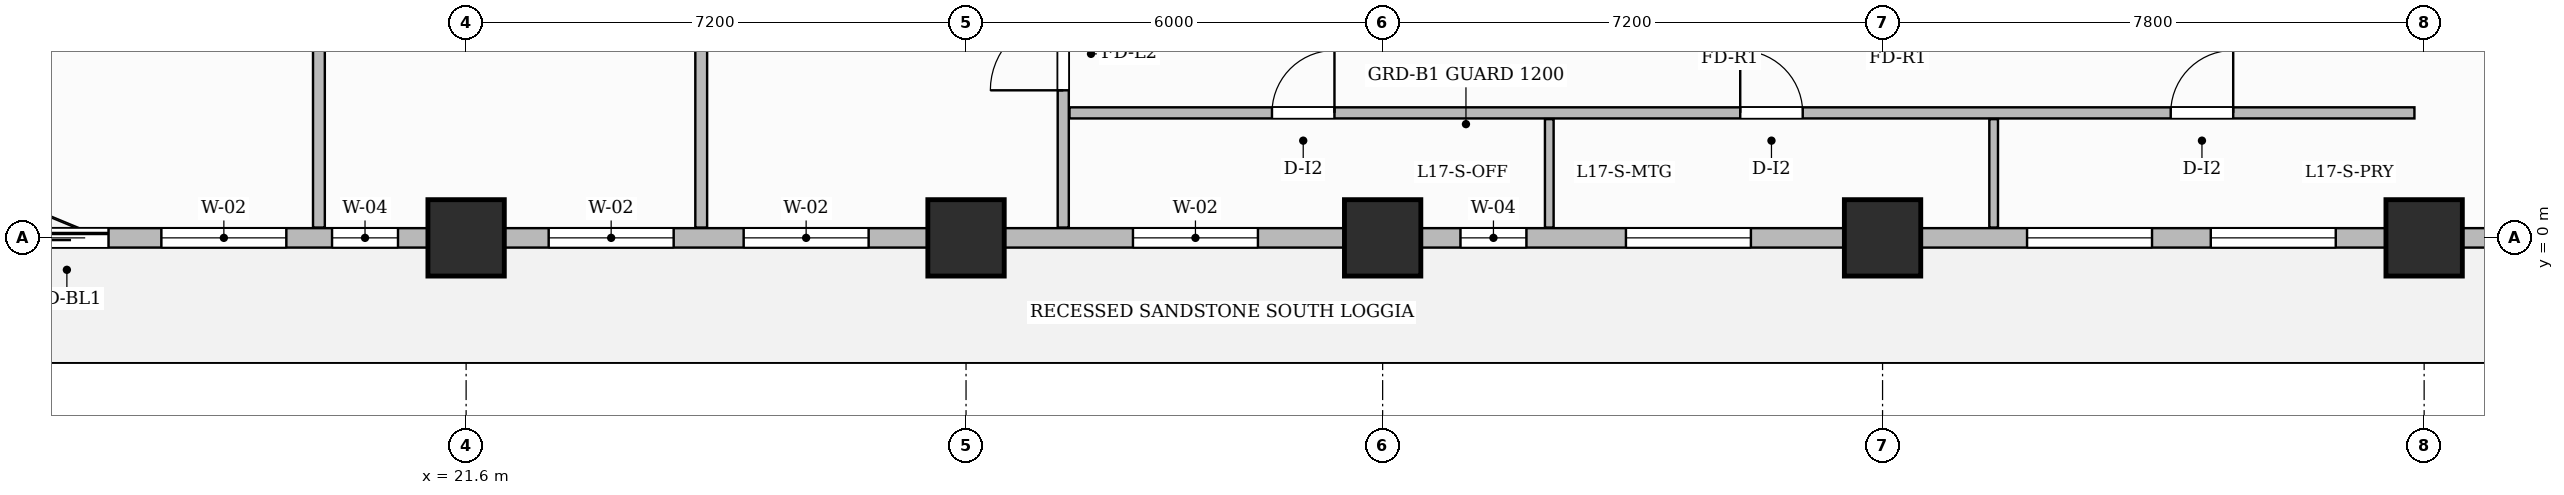
"""IFC4 building model, lengths in metres.
Left out: names, types, materials, properties, quantities, classifications, styles, units other than length and angle.
Written with IfcOpenShell. Run it as: python <this file> out.ifc"""

import sys

from ifc_helpers import new_model, si_unit, direction, frame, frame_2d, origin, origin_2d, place, context, subcontext, project, spatial, rectangle, extrude, source, transform, mapped, element, fill, save


model = new_model("IFC4")
c1 = context("Model", 3, precision=1e-05, world=origin(), true_north=direction((0.0, 1.0)))
c2 = subcontext(c1, "Body", "Model", "MODEL_VIEW")
j1 = project(units=[si_unit("LENGTHUNIT", "METRE"), si_unit("PLANEANGLEUNIT", "RADIAN")], contexts=[c1])
p1 = place(None, origin())
s1 = spatial("IfcSite", under=j1, at=p1, CompositionType="ELEMENT")
p2 = place(p1, origin())
s2 = spatial("IfcBuilding", under=s1, at=p2, CompositionType="ELEMENT")
p3 = place(p2, frame((0.0, 0.0, 73.1)))
s3 = spatial("IfcBuildingStorey", under=s2, at=p3, CompositionType="ELEMENT", Elevation=73.1)
m1 = source(origin(), c2, "Body", "SweptSolid", [
    extrude(rectangle(XDim=1.1, YDim=1.1, at=origin_2d()), origin(), (0.0, 0.0, 1.0), 3.7),
])
for number, where, z_axis, x_axis in (
    (1, (21.6, 0.0, 0.0), (0.0, 0.0, 1.0), (1.0, 0.0, 0.0)),
    (2, (28.8, 0.0, 0.0), (0.0, 0.0, 1.0), (1.0, 0.0, 0.0)),
    (3, (34.8, 0.0, 0.0), (0.0, 0.0, 1.0), (1.0, 0.0, 0.0)),
    (4, (42.0, 0.0, 0.0), (0.0, 0.0, 1.0), (1.0, 0.0, 0.0)),
    (5, (49.8, 0.0, 0.0), (0.0, 0.0, 1.0), (1.0, 0.0, 0.0)),
):
    element("IfcColumn", number, at=place(p3, frame(where, z_axis=z_axis, x_axis=x_axis)), inside=s3, PredefinedType="COLUMN", context=c2, shape_type="MappedRepresentation", body=[
        mapped(m1, transform((0.0, 0.0, 0.0), scale=1.0)),
    ])
p4 = place(p3, frame((30.2, 0.148, 0.0), z_axis=(0.0, 0.0, 1.0), x_axis=(0.0, 1.0, 0.0)))
e6 = element("IfcWall", 6, at=p4, inside=s3, PredefinedType="PARTITIONING", context=c2, shape_type="SweptSolid", body=[
    extrude(rectangle(XDim=9.112, YDim=0.16, at=frame_2d((4.556, 0.0))), origin(), (0.0, 0.0, 1.0), 3.45),
])
p5 = place(p4, frame((1.977, 0.0, 0.0)))
e7 = element("IfcOpeningElement", 7, at=p5, cuts=e6, PredefinedType="OPENING", context=c2, shape_type="SweptSolid", body=[
    extrude(rectangle(XDim=1.05, YDim=2.15, at=frame_2d((0.525, 1.075))), frame((0.0, 0.09, 0.0), z_axis=(0.0, -1.0, 0.0), x_axis=(1.0, 0.0, 0.0)), (0.0, 0.0, 1.0), 0.18),
])
p6 = place(p3, frame((30.29, 1.8, 0.0), z_axis=(0.0, 0.0, 1.0), x_axis=(1.0, 0.0, 0.0)))
e8 = element("IfcWall", 8, at=p6, inside=s3, PredefinedType="PARTITIONING", context=c2, shape_type="SweptSolid", body=[
    extrude(rectangle(XDim=19.37, YDim=0.16, at=frame_2d((9.685, 0.0))), origin(), (0.0, 0.0, 1.0), 3.45),
])
p7 = place(p6, frame((2.916, 0.0, 0.0)))
e9 = element("IfcOpeningElement", 9, at=p7, cuts=e8, PredefinedType="OPENING", context=c2, shape_type="SweptSolid", body=[
    extrude(rectangle(XDim=0.9, YDim=2.15, at=frame_2d((0.45, 1.075))), frame((0.0, 0.09, 0.0), z_axis=(0.0, -1.0, 0.0), x_axis=(1.0, 0.0, 0.0)), (0.0, 0.0, 1.0), 0.18),
])
p8 = place(p6, frame((9.66, 0.0, 0.0)))
e10 = element("IfcOpeningElement", 10, at=p8, cuts=e8, PredefinedType="OPENING", context=c2, shape_type="SweptSolid", body=[
    extrude(rectangle(XDim=0.9, YDim=2.15, at=frame_2d((0.45, 1.075))), frame((0.0, 0.09, 0.0), z_axis=(0.0, -1.0, 0.0), x_axis=(1.0, 0.0, 0.0)), (0.0, 0.0, 1.0), 0.18),
])
p9 = place(p6, frame((15.86, 0.0, 0.0)))
e11 = element("IfcOpeningElement", 11, at=p9, cuts=e8, PredefinedType="OPENING", context=c2, shape_type="SweptSolid", body=[
    extrude(rectangle(XDim=0.9, YDim=2.15, at=frame_2d((0.45, 1.075))), frame((0.0, 0.09, 0.0), z_axis=(0.0, -1.0, 0.0), x_axis=(1.0, 0.0, 0.0)), (0.0, 0.0, 1.0), 0.18),
])
for number, where, z_axis, x_axis in (
    (12, (37.2, 0.148, 0.0), (0.0, 0.0, 1.0), (0.0, 1.0, 0.0)),
    (13, (43.6, 0.148, 0.0), (0.0, 0.0, 1.0), (0.0, 1.0, 0.0)),
):
    element("IfcWall", number, at=place(p3, frame(where, z_axis=z_axis, x_axis=x_axis)), inside=s3, PredefinedType="PARTITIONING", context=c2, shape_type="SweptSolid", body=[
        extrude(rectangle(XDim=1.562, YDim=0.125, at=frame_2d((0.781, 0.0))), origin(), (0.0, 0.0, 1.0), 3.45),
    ])
p10 = place(p3, frame((19.48, 0.148, 0.0), z_axis=(0.0, 0.0, 1.0), x_axis=(0.0, 1.0, 0.0)))
e14 = element("IfcWall", 14, at=p10, inside=s3, PredefinedType="PARTITIONING", context=c2, shape_type="SweptSolid", body=[
    extrude(rectangle(XDim=9.112, YDim=0.17, at=frame_2d((4.556, 0.0))), origin(), (0.0, 0.0, 1.0), 3.45),
])
p11 = place(p3, frame((24.986, 0.148, 0.0), z_axis=(0.0, 0.0, 1.0), x_axis=(0.0, 1.0, 0.0)))
e15 = element("IfcWall", 15, at=p11, inside=s3, PredefinedType="PARTITIONING", context=c2, shape_type="SweptSolid", body=[
    extrude(rectangle(XDim=9.112, YDim=0.17, at=frame_2d((4.556, 0.0))), origin(), (0.0, 0.0, 1.0), 3.075),
])
p12 = place(p3, frame((14.4, 0.0, 0.0), z_axis=(0.0, 0.0, 1.0), x_axis=(1.0, 0.0, 0.0)))
e16 = element("IfcWall", 16, at=p12, inside=s3, PredefinedType="SOLIDWALL", context=c2, shape_type="SweptSolid", body=[
    extrude(rectangle(XDim=43.2, YDim=0.28, at=frame_2d((21.6, 0.0))), origin(), (0.0, 0.0, 1.0), 2.885),
])
p13 = place(p12, frame((0.85, 0.0, 0.0)))
e17 = element("IfcOpeningElement", 17, at=p13, cuts=e16, PredefinedType="OPENING", context=c2, shape_type="SweptSolid", body=[
    extrude(rectangle(XDim=1.2, YDim=2.2, at=frame_2d((0.6, 1.1))), frame((0.0, 0.15, 0.0), z_axis=(0.0, -1.0, 0.0), x_axis=(1.0, 0.0, 0.0)), (0.0, 0.0, 1.0), 0.3),
])
p14 = place(p12, frame((2.811, 0.0, 0.8)))
e18 = element("IfcOpeningElement", 18, at=p14, cuts=e16, PredefinedType="OPENING", context=c2, shape_type="SweptSolid", body=[
    extrude(rectangle(XDim=1.8, YDim=1.85, at=frame_2d((0.9, 0.925))), frame((0.0, 0.15, 0.0), z_axis=(0.0, -1.0, 0.0), x_axis=(1.0, 0.0, 0.0)), (0.0, 0.0, 1.0), 0.3),
])
p15 = place(p12, frame((5.269, 0.0, 0.8)))
e19 = element("IfcOpeningElement", 19, at=p15, cuts=e16, PredefinedType="OPENING", context=c2, shape_type="SweptSolid", body=[
    extrude(rectangle(XDim=0.95, YDim=1.75, at=frame_2d((0.475, 0.875))), frame((0.0, 0.15, 0.0), z_axis=(0.0, -1.0, 0.0), x_axis=(1.0, 0.0, 0.0)), (0.0, 0.0, 1.0), 0.3),
])
p16 = place(p12, frame((8.389, 0.0, 0.8)))
e20 = element("IfcOpeningElement", 20, at=p16, cuts=e16, PredefinedType="OPENING", context=c2, shape_type="SweptSolid", body=[
    extrude(rectangle(XDim=1.8, YDim=1.85, at=frame_2d((0.9, 0.925))), frame((0.0, 0.15, 0.0), z_axis=(0.0, -1.0, 0.0), x_axis=(1.0, 0.0, 0.0)), (0.0, 0.0, 1.0), 0.3),
])
p17 = place(p12, frame((11.197, 0.0, 0.8)))
e21 = element("IfcOpeningElement", 21, at=p17, cuts=e16, PredefinedType="OPENING", context=c2, shape_type="SweptSolid", body=[
    extrude(rectangle(XDim=1.8, YDim=1.85, at=frame_2d((0.9, 0.925))), frame((0.0, 0.15, 0.0), z_axis=(0.0, -1.0, 0.0), x_axis=(1.0, 0.0, 0.0)), (0.0, 0.0, 1.0), 0.3),
])
p18 = place(p12, frame((16.804, 0.0, 0.8)))
e22 = element("IfcOpeningElement", 22, at=p18, cuts=e16, PredefinedType="OPENING", context=c2, shape_type="SweptSolid", body=[
    extrude(rectangle(XDim=1.8, YDim=1.85, at=frame_2d((0.9, 0.925))), frame((0.0, 0.15, 0.0), z_axis=(0.0, -1.0, 0.0), x_axis=(1.0, 0.0, 0.0)), (0.0, 0.0, 1.0), 0.3),
])
p19 = place(p12, frame((21.521, 0.0, 0.8)))
e23 = element("IfcOpeningElement", 23, at=p19, cuts=e16, PredefinedType="OPENING", context=c2, shape_type="SweptSolid", body=[
    extrude(rectangle(XDim=0.95, YDim=1.75, at=frame_2d((0.475, 0.875))), frame((0.0, 0.15, 0.0), z_axis=(0.0, -1.0, 0.0), x_axis=(1.0, 0.0, 0.0)), (0.0, 0.0, 1.0), 0.3),
])
p20 = place(p12, frame((23.904, 0.0, 0.8)))
e24 = element("IfcOpeningElement", 24, at=p20, cuts=e16, PredefinedType="OPENING", context=c2, shape_type="SweptSolid", body=[
    extrude(rectangle(XDim=1.8, YDim=1.85, at=frame_2d((0.9, 0.925))), frame((0.0, 0.15, 0.0), z_axis=(0.0, -1.0, 0.0), x_axis=(1.0, 0.0, 0.0)), (0.0, 0.0, 1.0), 0.3),
])
p21 = place(p12, frame((29.681, 0.0, 0.8)))
e25 = element("IfcOpeningElement", 25, at=p21, cuts=e16, PredefinedType="OPENING", context=c2, shape_type="SweptSolid", body=[
    extrude(rectangle(XDim=1.8, YDim=1.85, at=frame_2d((0.9, 0.925))), frame((0.0, 0.15, 0.0), z_axis=(0.0, -1.0, 0.0), x_axis=(1.0, 0.0, 0.0)), (0.0, 0.0, 1.0), 0.3),
])
p22 = place(p12, frame((32.327, 0.0, 0.8)))
e26 = element("IfcOpeningElement", 26, at=p22, cuts=e16, PredefinedType="OPENING", context=c2, shape_type="SweptSolid", body=[
    extrude(rectangle(XDim=1.8, YDim=1.85, at=frame_2d((0.9, 0.925))), frame((0.0, 0.15, 0.0), z_axis=(0.0, -1.0, 0.0), x_axis=(1.0, 0.0, 0.0)), (0.0, 0.0, 1.0), 0.3),
])
p23 = place(p12, frame((36.875, 0.0, 0.8)))
e27 = element("IfcOpeningElement", 27, at=p23, cuts=e16, PredefinedType="OPENING", context=c2, shape_type="SweptSolid", body=[
    extrude(rectangle(XDim=1.8, YDim=1.85, at=frame_2d((0.9, 0.925))), frame((0.0, 0.15, 0.0), z_axis=(0.0, -1.0, 0.0), x_axis=(1.0, 0.0, 0.0)), (0.0, 0.0, 1.0), 0.3),
])
p24 = place(p12, frame((39.925, 0.0, 0.8)))
e28 = element("IfcOpeningElement", 28, at=p24, cuts=e16, PredefinedType="OPENING", context=c2, shape_type="SweptSolid", body=[
    extrude(rectangle(XDim=1.8, YDim=1.85, at=frame_2d((0.9, 0.925))), frame((0.0, 0.15, 0.0), z_axis=(0.0, -1.0, 0.0), x_axis=(1.0, 0.0, 0.0)), (0.0, 0.0, 1.0), 0.3),
])
m2 = source(origin(), c2, "Body", "SweptSolid", [
    extrude(rectangle(XDim=1.05, YDim=2.15, at=frame_2d((0.525, 1.075))), frame((0.0, 0.025, 0.0), z_axis=(0.0, -1.0, 0.0), x_axis=(1.0, 0.0, 0.0)), (0.0, 0.0, 1.0), 0.05),
])
p25 = place(p5, origin())
e29 = element("IfcDoor", 29, at=p25, inside=s3, OperationType="SINGLE_SWING_LEFT", PredefinedType="DOOR", context=c2, shape_type="MappedRepresentation", body=[
    mapped(m2, transform((0.0, 0.0, 0.0), scale=1.0)),
])
fill(e7, e29)
m3 = source(origin(), c2, "Body", "SweptSolid", [
    extrude(rectangle(XDim=0.9, YDim=2.15, at=frame_2d((0.45, 1.075))), frame((0.0, 0.025, 0.0), z_axis=(0.0, -1.0, 0.0), x_axis=(1.0, 0.0, 0.0)), (0.0, 0.0, 1.0), 0.05),
])
p26 = place(p7, origin())
e30 = element("IfcDoor", 30, at=p26, inside=s3, OperationType="SINGLE_SWING_RIGHT", PredefinedType="DOOR", context=c2, shape_type="MappedRepresentation", body=[
    mapped(m3, transform((0.0, 0.0, 0.0), scale=1.0)),
])
fill(e9, e30)
p27 = place(p8, origin())
e31 = element("IfcDoor", 31, at=p27, inside=s3, OperationType="SINGLE_SWING_LEFT", PredefinedType="DOOR", context=c2, shape_type="MappedRepresentation", body=[
    mapped(m3, transform((0.0, 0.0, 0.0), scale=1.0)),
])
fill(e10, e31)
p28 = place(p9, origin())
e32 = element("IfcDoor", 32, at=p28, inside=s3, OperationType="SINGLE_SWING_RIGHT", PredefinedType="DOOR", context=c2, shape_type="MappedRepresentation", body=[
    mapped(m3, transform((0.0, 0.0, 0.0), scale=1.0)),
])
fill(e11, e32)
m4 = source(origin(), c2, "Body", "SweptSolid", [
    extrude(rectangle(XDim=1.2, YDim=2.2, at=frame_2d((0.6, 1.1))), frame((0.0, 0.025, 0.0), z_axis=(0.0, -1.0, 0.0), x_axis=(1.0, 0.0, 0.0)), (0.0, 0.0, 1.0), 0.05),
])
p29 = place(p13, origin())
e33 = element("IfcDoor", 33, at=p29, inside=s3, OperationType="SLIDING_TO_LEFT", PredefinedType="DOOR", context=c2, shape_type="MappedRepresentation", body=[
    mapped(m4, transform((0.0, 0.0, 0.0), scale=1.0)),
])
fill(e17, e33)
m5 = source(origin(), c2, "Body", "SweptSolid", [
    extrude(rectangle(XDim=1.8, YDim=1.85, at=frame_2d((0.9, 0.925))), frame((0.0, 0.03, 0.0), z_axis=(0.0, -1.0, 0.0), x_axis=(1.0, 0.0, 0.0)), (0.0, 0.0, 1.0), 0.06),
])
p30 = place(p14, origin())
e34 = element("IfcWindow", 34, at=p30, inside=s3, PartitioningType="DOUBLE_PANEL_VERTICAL", PredefinedType="WINDOW", context=c2, shape_type="MappedRepresentation", body=[
    mapped(m5, transform((0.0, 0.0, 0.0), scale=1.0)),
])
fill(e18, e34)
m6 = source(origin(), c2, "Body", "SweptSolid", [
    extrude(rectangle(XDim=0.95, YDim=1.75, at=frame_2d((0.475, 0.875))), frame((0.0, 0.03, 0.0), z_axis=(0.0, -1.0, 0.0), x_axis=(1.0, 0.0, 0.0)), (0.0, 0.0, 1.0), 0.06),
])
p31 = place(p15, origin())
e35 = element("IfcWindow", 35, at=p31, inside=s3, PartitioningType="SINGLE_PANEL", PredefinedType="WINDOW", context=c2, shape_type="MappedRepresentation", body=[
    mapped(m6, transform((0.0, 0.0, 0.0), scale=1.0)),
])
fill(e19, e35)
p32 = place(p16, origin())
e36 = element("IfcWindow", 36, at=p32, inside=s3, PartitioningType="DOUBLE_PANEL_VERTICAL", PredefinedType="WINDOW", context=c2, shape_type="MappedRepresentation", body=[
    mapped(m5, transform((0.0, 0.0, 0.0), scale=1.0)),
])
fill(e20, e36)
p33 = place(p17, origin())
e37 = element("IfcWindow", 37, at=p33, inside=s3, PartitioningType="DOUBLE_PANEL_VERTICAL", PredefinedType="WINDOW", context=c2, shape_type="MappedRepresentation", body=[
    mapped(m5, transform((0.0, 0.0, 0.0), scale=1.0)),
])
fill(e21, e37)
p34 = place(p18, origin())
e38 = element("IfcWindow", 38, at=p34, inside=s3, PartitioningType="DOUBLE_PANEL_VERTICAL", PredefinedType="WINDOW", context=c2, shape_type="MappedRepresentation", body=[
    mapped(m5, transform((0.0, 0.0, 0.0), scale=1.0)),
])
fill(e22, e38)
p35 = place(p19, origin())
e39 = element("IfcWindow", 39, at=p35, inside=s3, PartitioningType="SINGLE_PANEL", PredefinedType="WINDOW", context=c2, shape_type="MappedRepresentation", body=[
    mapped(m6, transform((0.0, 0.0, 0.0), scale=1.0)),
])
fill(e23, e39)
p36 = place(p20, origin())
e40 = element("IfcWindow", 40, at=p36, inside=s3, PartitioningType="DOUBLE_PANEL_VERTICAL", PredefinedType="WINDOW", context=c2, shape_type="MappedRepresentation", body=[
    mapped(m5, transform((0.0, 0.0, 0.0), scale=1.0)),
])
fill(e24, e40)
p37 = place(p21, origin())
e41 = element("IfcWindow", 41, at=p37, inside=s3, PartitioningType="DOUBLE_PANEL_VERTICAL", PredefinedType="WINDOW", context=c2, shape_type="MappedRepresentation", body=[
    mapped(m5, transform((0.0, 0.0, 0.0), scale=1.0)),
])
fill(e25, e41)
p38 = place(p22, origin())
e42 = element("IfcWindow", 42, at=p38, inside=s3, PartitioningType="DOUBLE_PANEL_VERTICAL", PredefinedType="WINDOW", context=c2, shape_type="MappedRepresentation", body=[
    mapped(m5, transform((0.0, 0.0, 0.0), scale=1.0)),
])
fill(e26, e42)
save(model, sys.argv[1])
